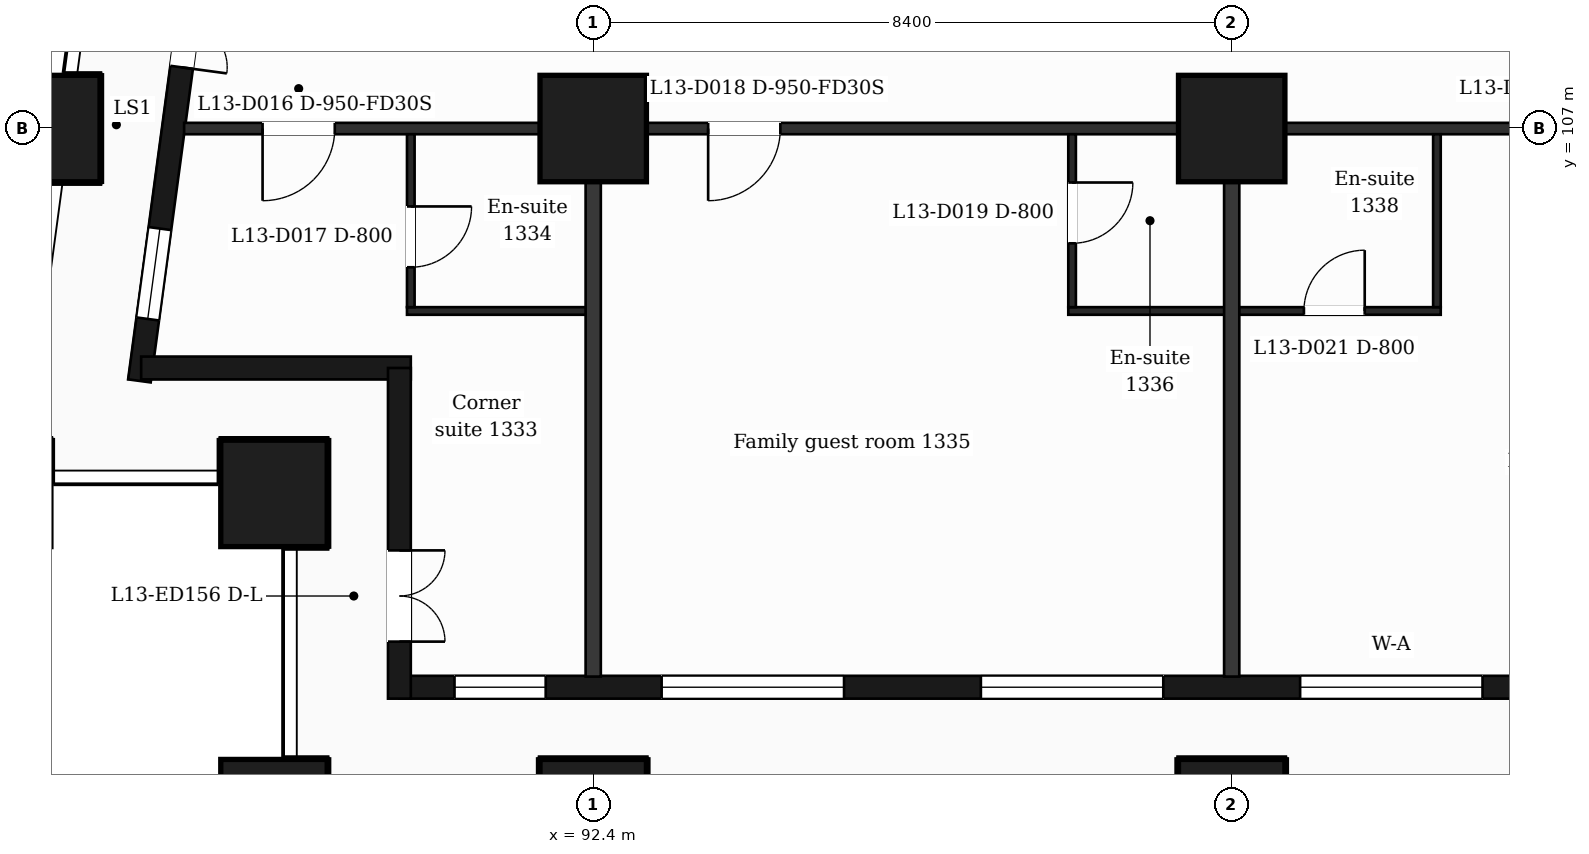
"""IFC4 building model, lengths in metres.
Left out: names, types, materials, properties, quantities, classifications, styles, units other than length and angle.
Written with IfcOpenShell. Run it as: python <this file> out.ifc"""

import sys

from ifc_helpers import new_model, si_unit, direction, frame, frame_2d, origin, origin_2d, place, context, subcontext, project, spatial, rectangle, extrude, element, fill, save


model = new_model("IFC4")
c1 = context("Model", 3, precision=1e-05, world=origin(), true_north=direction((0.0, 1.0)))
c2 = subcontext(c1, "Body", "Model", "MODEL_VIEW")
j1 = project(units=[si_unit("LENGTHUNIT", "METRE"), si_unit("PLANEANGLEUNIT", "RADIAN")], contexts=[c1])
p1 = place(None, origin())
s1 = spatial("IfcSite", under=j1, at=p1, CompositionType="ELEMENT")
p2 = place(p1, origin())
s2 = spatial("IfcBuilding", under=s1, at=p2, CompositionType="ELEMENT")
p3 = place(p2, frame((0.0, 0.0, 63.5)))
s3 = spatial("IfcBuildingStorey", under=s2, at=p3, CompositionType="ELEMENT", Elevation=63.5)
for number, where, z_axis, x_axis in (
    (1, (92.4, 98.0, 0.0), (0.0, 0.0, 1.0), (1.0, 0.0, 0.0)),
    (2, (100.8, 98.0, 0.0), (0.0, 0.0, 1.0), (1.0, 0.0, 0.0)),
    (3, (88.2, 98.0, 0.0), (0.0, 0.0, 1.0), (1.0, 0.0, 0.0)),
    (4, (88.2, 102.2, 0.0), (0.0, 0.0, 1.0), (1.0, 0.0, 0.0)),
    (5, (92.4, 107.0, 0.0), (0.0, 0.0, 1.0), (1.0, 0.0, 0.0)),
    (6, (100.8, 107.0, 0.0), (0.0, 0.0, 1.0), (1.0, 0.0, 0.0)),
    (7, (85.211, 107.0, 0.0), (0.0, 0.0, 1.0), (1.0, 0.0, 0.0)),
):
    element("IfcColumn", number, at=place(p3, frame(where, z_axis=z_axis, x_axis=x_axis)), inside=s3, PredefinedType="COLUMN", context=c2, shape_type="SweptSolid", body=[
        extrude(rectangle(XDim=1.4, YDim=1.4, at=origin_2d()), origin(), (0.0, 0.0, 1.0), 3.5),
    ])
p4 = place(p3, frame((89.85, 99.65, 0.0), z_axis=(0.0, 0.0, 1.0), x_axis=(1.0, 0.0, 0.0)))
e8 = element("IfcWall", 8, at=p4, inside=s3, PredefinedType="SOLIDWALL", context=c2, shape_type="SweptSolid", body=[
    extrude(rectangle(XDim=47.25, YDim=0.3, at=frame_2d((23.625, 0.0))), origin(), (0.0, 0.0, 1.0), 3.18),
])
p5 = place(p4, frame((0.725, 0.0, 0.9)))
e9 = element("IfcOpeningElement", 9, at=p5, cuts=e8, PredefinedType="OPENING", context=c2, shape_type="SweptSolid", body=[
    extrude(rectangle(XDim=1.2, YDim=2.1, at=frame_2d((0.6, 1.05))), frame((0.0, 0.16, 0.0), z_axis=(0.0, -1.0, 0.0), x_axis=(1.0, 0.0, 0.0)), (0.0, 0.0, 1.0), 0.32),
])
p6 = place(p4, frame((3.45, 0.0, 0.9)))
e10 = element("IfcOpeningElement", 10, at=p6, cuts=e8, PredefinedType="OPENING", context=c2, shape_type="SweptSolid", body=[
    extrude(rectangle(XDim=2.4, YDim=2.1, at=frame_2d((1.2, 1.05))), frame((0.0, 0.16, 0.0), z_axis=(0.0, -1.0, 0.0), x_axis=(1.0, 0.0, 0.0)), (0.0, 0.0, 1.0), 0.32),
])
p7 = place(p4, frame((7.65, 0.0, 0.9)))
e11 = element("IfcOpeningElement", 11, at=p7, cuts=e8, PredefinedType="OPENING", context=c2, shape_type="SweptSolid", body=[
    extrude(rectangle(XDim=2.4, YDim=2.1, at=frame_2d((1.2, 1.05))), frame((0.0, 0.16, 0.0), z_axis=(0.0, -1.0, 0.0), x_axis=(1.0, 0.0, 0.0)), (0.0, 0.0, 1.0), 0.32),
])
p8 = place(p4, frame((11.85, 0.0, 0.9)))
e12 = element("IfcOpeningElement", 12, at=p8, cuts=e8, PredefinedType="OPENING", context=c2, shape_type="SweptSolid", body=[
    extrude(rectangle(XDim=2.4, YDim=2.1, at=frame_2d((1.2, 1.05))), frame((0.0, 0.16, 0.0), z_axis=(0.0, -1.0, 0.0), x_axis=(1.0, 0.0, 0.0)), (0.0, 0.0, 1.0), 0.32),
])
p9 = place(p4, frame((16.05, 0.0, 0.9)))
e13 = element("IfcOpeningElement", 13, at=p9, cuts=e8, PredefinedType="OPENING", context=c2, shape_type="SweptSolid", body=[
    extrude(rectangle(XDim=2.4, YDim=2.1, at=frame_2d((1.2, 1.05))), frame((0.0, 0.16, 0.0), z_axis=(0.0, -1.0, 0.0), x_axis=(1.0, 0.0, 0.0)), (0.0, 0.0, 1.0), 0.32),
])
p10 = place(p4, frame((20.25, 0.0, 0.9)))
e14 = element("IfcOpeningElement", 14, at=p10, cuts=e8, PredefinedType="OPENING", context=c2, shape_type="SweptSolid", body=[
    extrude(rectangle(XDim=2.4, YDim=2.1, at=frame_2d((1.2, 1.05))), frame((0.0, 0.16, 0.0), z_axis=(0.0, -1.0, 0.0), x_axis=(1.0, 0.0, 0.0)), (0.0, 0.0, 1.0), 0.32),
])
p11 = place(p4, frame((25.05, 0.0, 0.9)))
e15 = element("IfcOpeningElement", 15, at=p11, cuts=e8, PredefinedType="OPENING", context=c2, shape_type="SweptSolid", body=[
    extrude(rectangle(XDim=1.2, YDim=2.1, at=frame_2d((0.6, 1.05))), frame((0.0, 0.16, 0.0), z_axis=(0.0, -1.0, 0.0), x_axis=(1.0, 0.0, 0.0)), (0.0, 0.0, 1.0), 0.32),
])
p12 = place(p4, frame((29.25, 0.0, 0.9)))
e16 = element("IfcOpeningElement", 16, at=p12, cuts=e8, PredefinedType="OPENING", context=c2, shape_type="SweptSolid", body=[
    extrude(rectangle(XDim=1.2, YDim=2.1, at=frame_2d((0.6, 1.05))), frame((0.0, 0.16, 0.0), z_axis=(0.0, -1.0, 0.0), x_axis=(1.0, 0.0, 0.0)), (0.0, 0.0, 1.0), 0.32),
])
p13 = place(p4, frame((32.55, 0.0, 0.0)))
e17 = element("IfcOpeningElement", 17, at=p13, cuts=e8, PredefinedType="OPENING", context=c2, shape_type="SweptSolid", body=[
    extrude(rectangle(XDim=1.2, YDim=2.4, at=frame_2d((0.6, 1.2))), frame((0.0, 0.16, 0.0), z_axis=(0.0, -1.0, 0.0), x_axis=(1.0, 0.0, 0.0)), (0.0, 0.0, 1.0), 0.32),
])
p14 = place(p4, frame((34.35, 0.0, 0.9)))
e18 = element("IfcOpeningElement", 18, at=p14, cuts=e8, PredefinedType="OPENING", context=c2, shape_type="SweptSolid", body=[
    extrude(rectangle(XDim=1.2, YDim=2.1, at=frame_2d((0.6, 1.05))), frame((0.0, 0.16, 0.0), z_axis=(0.0, -1.0, 0.0), x_axis=(1.0, 0.0, 0.0)), (0.0, 0.0, 1.0), 0.32),
])
p15 = place(p4, frame((37.05, 0.0, 0.9)))
e19 = element("IfcOpeningElement", 19, at=p15, cuts=e8, PredefinedType="OPENING", context=c2, shape_type="SweptSolid", body=[
    extrude(rectangle(XDim=2.4, YDim=2.1, at=frame_2d((1.2, 1.05))), frame((0.0, 0.16, 0.0), z_axis=(0.0, -1.0, 0.0), x_axis=(1.0, 0.0, 0.0)), (0.0, 0.0, 1.0), 0.32),
])
p16 = place(p4, frame((40.95, 0.0, 0.0)))
e20 = element("IfcOpeningElement", 20, at=p16, cuts=e8, PredefinedType="OPENING", context=c2, shape_type="SweptSolid", body=[
    extrude(rectangle(XDim=1.2, YDim=2.4, at=frame_2d((0.6, 1.2))), frame((0.0, 0.16, 0.0), z_axis=(0.0, -1.0, 0.0), x_axis=(1.0, 0.0, 0.0)), (0.0, 0.0, 1.0), 0.32),
])
p17 = place(p4, frame((42.75, 0.0, 0.9)))
e21 = element("IfcOpeningElement", 21, at=p17, cuts=e8, PredefinedType="OPENING", context=c2, shape_type="SweptSolid", body=[
    extrude(rectangle(XDim=1.2, YDim=2.1, at=frame_2d((0.6, 1.05))), frame((0.0, 0.16, 0.0), z_axis=(0.0, -1.0, 0.0), x_axis=(1.0, 0.0, 0.0)), (0.0, 0.0, 1.0), 0.32),
])
p18 = place(p4, frame((45.25, 0.0, 0.9)))
e22 = element("IfcOpeningElement", 22, at=p18, cuts=e8, PredefinedType="OPENING", context=c2, shape_type="SweptSolid", body=[
    extrude(rectangle(XDim=1.2, YDim=2.1, at=frame_2d((0.6, 1.05))), frame((0.0, 0.16, 0.0), z_axis=(0.0, -1.0, 0.0), x_axis=(1.0, 0.0, 0.0)), (0.0, 0.0, 1.0), 0.32),
])
p19 = place(p3, frame((87.334, 110.4, 0.0), z_axis=(0.0, 0.0, 1.0), x_axis=(-0.133437175554, -0.991057273915, 0.0)))
e23 = element("IfcWall", 23, at=p19, inside=s3, PredefinedType="SOLIDWALL", context=c2, shape_type="SweptSolid", body=[
    extrude(rectangle(XDim=6.781, YDim=0.3, at=frame_2d((3.39, 0.0))), origin(), (0.0, 0.0, 1.0), 3.18),
])
p20 = place(p19, frame((1.418, 0.0, 0.0)))
e24 = element("IfcOpeningElement", 24, at=p20, cuts=e23, PredefinedType="OPENING", context=c2, shape_type="SweptSolid", body=[
    extrude(rectangle(XDim=1.2, YDim=2.4, at=frame_2d((0.6, 1.2))), frame((0.0, 0.16, 0.0), z_axis=(0.0, -1.0, 0.0), x_axis=(1.0, 0.0, 0.0)), (0.0, 0.0, 1.0), 0.32),
])
p21 = place(p19, frame((4.758, 0.0, 0.9)))
e25 = element("IfcOpeningElement", 25, at=p21, cuts=e23, PredefinedType="OPENING", context=c2, shape_type="SweptSolid", body=[
    extrude(rectangle(XDim=1.2, YDim=2.1, at=frame_2d((0.6, 1.05))), frame((0.0, 0.16, 0.0), z_axis=(0.0, -1.0, 0.0), x_axis=(1.0, 0.0, 0.0)), (0.0, 0.0, 1.0), 0.32),
])
p22 = place(p3, frame((86.452, 103.85, 0.0), z_axis=(0.0, 0.0, 1.0), x_axis=(1.0, 0.0, 0.0)))
e26 = element("IfcWall", 26, at=p22, inside=s3, PredefinedType="SOLIDWALL", context=c2, shape_type="SweptSolid", body=[
    extrude(rectangle(XDim=3.548, YDim=0.3, at=frame_2d((1.774, 0.0))), origin(), (0.0, 0.0, 1.0), 3.18),
])
p23 = place(p3, frame((89.85, 103.85, 0.0), z_axis=(0.0, 0.0, 1.0), x_axis=(0.0, -1.0, 0.0)))
e27 = element("IfcWall", 27, at=p23, inside=s3, PredefinedType="SOLIDWALL", context=c2, shape_type="SweptSolid", body=[
    extrude(rectangle(XDim=4.35, YDim=0.3, at=frame_2d((2.175, 0.0))), origin(), (0.0, 0.0, 1.0), 3.18),
])
p24 = place(p23, frame((2.4, 0.0, 0.0)))
e28 = element("IfcOpeningElement", 28, at=p24, cuts=e27, PredefinedType="OPENING", context=c2, shape_type="SweptSolid", body=[
    extrude(rectangle(XDim=1.2, YDim=2.4, at=frame_2d((0.6, 1.2))), frame((0.0, 0.16, 0.0), z_axis=(0.0, -1.0, 0.0), x_axis=(1.0, 0.0, 0.0)), (0.0, 0.0, 1.0), 0.32),
])
p25 = place(p3, frame((89.95, 104.6, 0.0), z_axis=(0.0, 0.0, 1.0), x_axis=(1.0, 0.0, 0.0)))
e29 = element("IfcWall", 29, at=p25, inside=s3, PredefinedType="PARTITIONING", context=c2, shape_type="SweptSolid", body=[
    extrude(rectangle(XDim=2.45, YDim=0.1, at=frame_2d((1.225, 0.0))), origin(), (0.0, 0.0, 1.0), 3.18),
])
p26 = place(p3, frame((98.65, 104.6, 0.0), z_axis=(0.0, 0.0, 1.0), x_axis=(1.0, 0.0, 0.0)))
e30 = element("IfcWall", 30, at=p26, inside=s3, PredefinedType="PARTITIONING", context=c2, shape_type="SweptSolid", body=[
    extrude(rectangle(XDim=4.9, YDim=0.1, at=frame_2d((2.45, 0.0))), origin(), (0.0, 0.0, 1.0), 3.18),
])
p27 = place(p26, frame((3.1, 0.0, 0.0)))
e31 = element("IfcOpeningElement", 31, at=p27, cuts=e30, PredefinedType="OPENING", context=c2, shape_type="SweptSolid", body=[
    extrude(rectangle(XDim=0.8, YDim=2.1, at=frame_2d((0.4, 1.05))), frame((0.0, 0.06, 0.0), z_axis=(0.0, -1.0, 0.0), x_axis=(1.0, 0.0, 0.0)), (0.0, 0.0, 1.0), 0.12),
])
p28 = place(p3, frame((87.018, 107.0, 0.0), z_axis=(0.0, 0.0, 1.0), x_axis=(1.0, 0.0, 0.0)))
e32 = element("IfcWall", 32, at=p28, inside=s3, PredefinedType="PARTITIONING", context=c2, shape_type="SweptSolid", body=[
    extrude(rectangle(XDim=52.765, YDim=0.15, at=frame_2d((26.382, 0.0))), origin(), (0.0, 0.0, 1.0), 3.18),
])
p29 = place(p28, frame((1.032, 0.0, 0.0)))
e33 = element("IfcOpeningElement", 33, at=p29, cuts=e32, PredefinedType="OPENING", context=c2, shape_type="SweptSolid", body=[
    extrude(rectangle(XDim=0.95, YDim=2.1, at=frame_2d((0.475, 1.05))), frame((0.0, 0.085, 0.0), z_axis=(0.0, -1.0, 0.0), x_axis=(1.0, 0.0, 0.0)), (0.0, 0.0, 1.0), 0.17),
])
p30 = place(p28, frame((6.894, 0.0, 0.0)))
e34 = element("IfcOpeningElement", 34, at=p30, cuts=e32, PredefinedType="OPENING", context=c2, shape_type="SweptSolid", body=[
    extrude(rectangle(XDim=0.95, YDim=2.1, at=frame_2d((0.475, 1.05))), frame((0.0, 0.085, 0.0), z_axis=(0.0, -1.0, 0.0), x_axis=(1.0, 0.0, 0.0)), (0.0, 0.0, 1.0), 0.17),
])
p31 = place(p28, frame((17.844, 0.0, 0.0)))
e35 = element("IfcOpeningElement", 35, at=p31, cuts=e32, PredefinedType="OPENING", context=c2, shape_type="SweptSolid", body=[
    extrude(rectangle(XDim=0.95, YDim=2.1, at=frame_2d((0.475, 1.05))), frame((0.0, 0.085, 0.0), z_axis=(0.0, -1.0, 0.0), x_axis=(1.0, 0.0, 0.0)), (0.0, 0.0, 1.0), 0.17),
])
p32 = place(p28, frame((26.245, 0.0, 0.0)))
e36 = element("IfcOpeningElement", 36, at=p32, cuts=e32, PredefinedType="OPENING", context=c2, shape_type="SweptSolid", body=[
    extrude(rectangle(XDim=0.95, YDim=2.1, at=frame_2d((0.475, 1.05))), frame((0.0, 0.085, 0.0), z_axis=(0.0, -1.0, 0.0), x_axis=(1.0, 0.0, 0.0)), (0.0, 0.0, 1.0), 0.17),
])
p33 = place(p28, frame((35.822, 0.0, 0.0)))
e37 = element("IfcOpeningElement", 37, at=p33, cuts=e32, PredefinedType="OPENING", context=c2, shape_type="SweptSolid", body=[
    extrude(rectangle(XDim=0.95, YDim=2.1, at=frame_2d((0.475, 1.05))), frame((0.0, 0.085, 0.0), z_axis=(0.0, -1.0, 0.0), x_axis=(1.0, 0.0, 0.0)), (0.0, 0.0, 1.0), 0.17),
])
p34 = place(p28, frame((42.302, 0.0, 0.0)))
e38 = element("IfcOpeningElement", 38, at=p34, cuts=e32, PredefinedType="OPENING", context=c2, shape_type="SweptSolid", body=[
    extrude(rectangle(XDim=0.95, YDim=2.1, at=frame_2d((0.475, 1.05))), frame((0.0, 0.085, 0.0), z_axis=(0.0, -1.0, 0.0), x_axis=(1.0, 0.0, 0.0)), (0.0, 0.0, 1.0), 0.17),
])
p35 = place(p28, frame((49.285, 0.0, 0.0)))
e39 = element("IfcOpeningElement", 39, at=p35, cuts=e32, PredefinedType="OPENING", context=c2, shape_type="SweptSolid", body=[
    extrude(rectangle(XDim=0.95, YDim=2.1, at=frame_2d((0.475, 1.05))), frame((0.0, 0.085, 0.0), z_axis=(0.0, -1.0, 0.0), x_axis=(1.0, 0.0, 0.0)), (0.0, 0.0, 1.0), 0.17),
])
p36 = place(p3, frame((90.0, 104.65, 0.0), z_axis=(0.0, 0.0, 1.0), x_axis=(0.0, 1.0, 0.0)))
e40 = element("IfcWall", 40, at=p36, inside=s3, PredefinedType="PARTITIONING", context=c2, shape_type="SweptSolid", body=[
    extrude(rectangle(XDim=2.275, YDim=0.1, at=frame_2d((1.138, 0.0))), origin(), (0.0, 0.0, 1.0), 3.18),
])
p37 = place(p36, frame((0.525, 0.0, 0.0)))
e41 = element("IfcOpeningElement", 41, at=p37, cuts=e40, PredefinedType="OPENING", context=c2, shape_type="SweptSolid", body=[
    extrude(rectangle(XDim=0.8, YDim=2.1, at=frame_2d((0.4, 1.05))), frame((0.0, 0.06, 0.0), z_axis=(0.0, -1.0, 0.0), x_axis=(1.0, 0.0, 0.0)), (0.0, 0.0, 1.0), 0.12),
])
p38 = place(p3, frame((92.4, 99.79, 0.0), z_axis=(0.0, 0.0, 1.0), x_axis=(0.0, 1.0, 0.0)))
e42 = element("IfcWall", 42, at=p38, inside=s3, PredefinedType="PARTITIONING", context=c2, shape_type="SweptSolid", body=[
    extrude(rectangle(XDim=7.135, YDim=0.2, at=frame_2d((3.567, 0.0))), origin(), (0.0, 0.0, 1.0), 3.18),
])
p39 = place(p3, frame((98.7, 104.65, 0.0), z_axis=(0.0, 0.0, 1.0), x_axis=(0.0, 1.0, 0.0)))
e43 = element("IfcWall", 43, at=p39, inside=s3, PredefinedType="PARTITIONING", context=c2, shape_type="SweptSolid", body=[
    extrude(rectangle(XDim=2.275, YDim=0.1, at=frame_2d((1.138, 0.0))), origin(), (0.0, 0.0, 1.0), 3.18),
])
p40 = place(p39, frame((0.84, 0.0, 0.0)))
e44 = element("IfcOpeningElement", 44, at=p40, cuts=e43, PredefinedType="OPENING", context=c2, shape_type="SweptSolid", body=[
    extrude(rectangle(XDim=0.8, YDim=2.1, at=frame_2d((0.4, 1.05))), frame((0.0, 0.06, 0.0), z_axis=(0.0, -1.0, 0.0), x_axis=(1.0, 0.0, 0.0)), (0.0, 0.0, 1.0), 0.12),
])
p41 = place(p3, frame((100.8, 99.79, 0.0), z_axis=(0.0, 0.0, 1.0), x_axis=(0.0, 1.0, 0.0)))
e45 = element("IfcWall", 45, at=p41, inside=s3, PredefinedType="PARTITIONING", context=c2, shape_type="SweptSolid", body=[
    extrude(rectangle(XDim=7.135, YDim=0.2, at=frame_2d((3.567, 0.0))), origin(), (0.0, 0.0, 1.0), 3.18),
])
p42 = place(p3, frame((103.5, 104.65, 0.0), z_axis=(0.0, 0.0, 1.0), x_axis=(0.0, 1.0, 0.0)))
e46 = element("IfcWall", 46, at=p42, inside=s3, PredefinedType="PARTITIONING", context=c2, shape_type="SweptSolid", body=[
    extrude(rectangle(XDim=2.275, YDim=0.1, at=frame_2d((1.138, 0.0))), origin(), (0.0, 0.0, 1.0), 3.18),
])
p43 = place(p5, origin())
e47 = element("IfcWindow", 47, at=p43, inside=s3, PartitioningType="SINGLE_PANEL", PredefinedType="WINDOW", context=c2, shape_type="SweptSolid", body=[
    extrude(rectangle(XDim=1.2, YDim=2.1, at=frame_2d((0.6, 1.05))), frame((0.0, 0.03, 0.0), z_axis=(0.0, -1.0, 0.0), x_axis=(1.0, 0.0, 0.0)), (0.0, 0.0, 1.0), 0.06),
])
fill(e9, e47)
p44 = place(p6, origin())
e48 = element("IfcWindow", 48, at=p44, inside=s3, PartitioningType="SINGLE_PANEL", PredefinedType="WINDOW", context=c2, shape_type="SweptSolid", body=[
    extrude(rectangle(XDim=2.4, YDim=2.1, at=frame_2d((1.2, 1.05))), frame((0.0, 0.03, 0.0), z_axis=(0.0, -1.0, 0.0), x_axis=(1.0, 0.0, 0.0)), (0.0, 0.0, 1.0), 0.06),
])
fill(e10, e48)
p45 = place(p7, origin())
e49 = element("IfcWindow", 49, at=p45, inside=s3, PartitioningType="SINGLE_PANEL", PredefinedType="WINDOW", context=c2, shape_type="SweptSolid", body=[
    extrude(rectangle(XDim=2.4, YDim=2.1, at=frame_2d((1.2, 1.05))), frame((0.0, 0.03, 0.0), z_axis=(0.0, -1.0, 0.0), x_axis=(1.0, 0.0, 0.0)), (0.0, 0.0, 1.0), 0.06),
])
fill(e11, e49)
p46 = place(p8, origin())
e50 = element("IfcWindow", 50, at=p46, inside=s3, PartitioningType="SINGLE_PANEL", PredefinedType="WINDOW", context=c2, shape_type="SweptSolid", body=[
    extrude(rectangle(XDim=2.4, YDim=2.1, at=frame_2d((1.2, 1.05))), frame((0.0, 0.03, 0.0), z_axis=(0.0, -1.0, 0.0), x_axis=(1.0, 0.0, 0.0)), (0.0, 0.0, 1.0), 0.06),
])
fill(e12, e50)
p47 = place(p20, origin())
e51 = element("IfcDoor", 51, at=p47, inside=s3, OperationType="DOUBLE_DOOR_SINGLE_SWING", PredefinedType="DOOR", context=c2, shape_type="SweptSolid", body=[
    extrude(rectangle(XDim=1.2, YDim=2.4, at=frame_2d((0.6, 1.2))), frame((0.0, 0.025, 0.0), z_axis=(0.0, -1.0, 0.0), x_axis=(1.0, 0.0, 0.0)), (0.0, 0.0, 1.0), 0.05),
])
fill(e24, e51)
p48 = place(p21, origin())
e52 = element("IfcWindow", 52, at=p48, inside=s3, PartitioningType="SINGLE_PANEL", PredefinedType="WINDOW", context=c2, shape_type="SweptSolid", body=[
    extrude(rectangle(XDim=1.2, YDim=2.1, at=frame_2d((0.6, 1.05))), frame((0.0, 0.03, 0.0), z_axis=(0.0, -1.0, 0.0), x_axis=(1.0, 0.0, 0.0)), (0.0, 0.0, 1.0), 0.06),
])
fill(e25, e52)
p49 = place(p24, origin())
e53 = element("IfcDoor", 53, at=p49, inside=s3, OperationType="DOUBLE_DOOR_SINGLE_SWING", PredefinedType="DOOR", context=c2, shape_type="SweptSolid", body=[
    extrude(rectangle(XDim=1.2, YDim=2.4, at=frame_2d((0.6, 1.2))), frame((0.0, 0.025, 0.0), z_axis=(0.0, -1.0, 0.0), x_axis=(1.0, 0.0, 0.0)), (0.0, 0.0, 1.0), 0.05),
])
fill(e28, e53)
p50 = place(p29, origin())
e54 = element("IfcDoor", 54, at=p50, inside=s3, OperationType="SINGLE_SWING_LEFT", PredefinedType="DOOR", context=c2, shape_type="SweptSolid", body=[
    extrude(rectangle(XDim=0.95, YDim=2.1, at=frame_2d((0.475, 1.05))), frame((0.0, 0.025, 0.0), z_axis=(0.0, -1.0, 0.0), x_axis=(1.0, 0.0, 0.0)), (0.0, 0.0, 1.0), 0.05),
])
fill(e33, e54)
p51 = place(p37, origin())
e55 = element("IfcDoor", 55, at=p51, inside=s3, OperationType="SINGLE_SWING_RIGHT", PredefinedType="DOOR", context=c2, shape_type="SweptSolid", body=[
    extrude(rectangle(XDim=0.8, YDim=2.1, at=frame_2d((0.4, 1.05))), frame((0.0, 0.025, 0.0), z_axis=(0.0, -1.0, 0.0), x_axis=(1.0, 0.0, 0.0)), (0.0, 0.0, 1.0), 0.05),
])
fill(e41, e55)
p52 = place(p30, origin())
e56 = element("IfcDoor", 56, at=p52, inside=s3, OperationType="SINGLE_SWING_LEFT", PredefinedType="DOOR", context=c2, shape_type="SweptSolid", body=[
    extrude(rectangle(XDim=0.95, YDim=2.1, at=frame_2d((0.475, 1.05))), frame((0.0, 0.025, 0.0), z_axis=(0.0, -1.0, 0.0), x_axis=(1.0, 0.0, 0.0)), (0.0, 0.0, 1.0), 0.05),
])
fill(e34, e56)
p53 = place(p40, origin())
e57 = element("IfcDoor", 57, at=p53, inside=s3, OperationType="SINGLE_SWING_RIGHT", PredefinedType="DOOR", context=c2, shape_type="SweptSolid", body=[
    extrude(rectangle(XDim=0.8, YDim=2.1, at=frame_2d((0.4, 1.05))), frame((0.0, 0.025, 0.0), z_axis=(0.0, -1.0, 0.0), x_axis=(1.0, 0.0, 0.0)), (0.0, 0.0, 1.0), 0.05),
])
fill(e44, e57)
p54 = place(p27, origin())
e58 = element("IfcDoor", 58, at=p54, inside=s3, OperationType="SINGLE_SWING_RIGHT", PredefinedType="DOOR", context=c2, shape_type="SweptSolid", body=[
    extrude(rectangle(XDim=0.8, YDim=2.1, at=frame_2d((0.4, 1.05))), frame((0.0, 0.025, 0.0), z_axis=(0.0, -1.0, 0.0), x_axis=(1.0, 0.0, 0.0)), (0.0, 0.0, 1.0), 0.05),
])
fill(e31, e58)
save(model, sys.argv[1])
